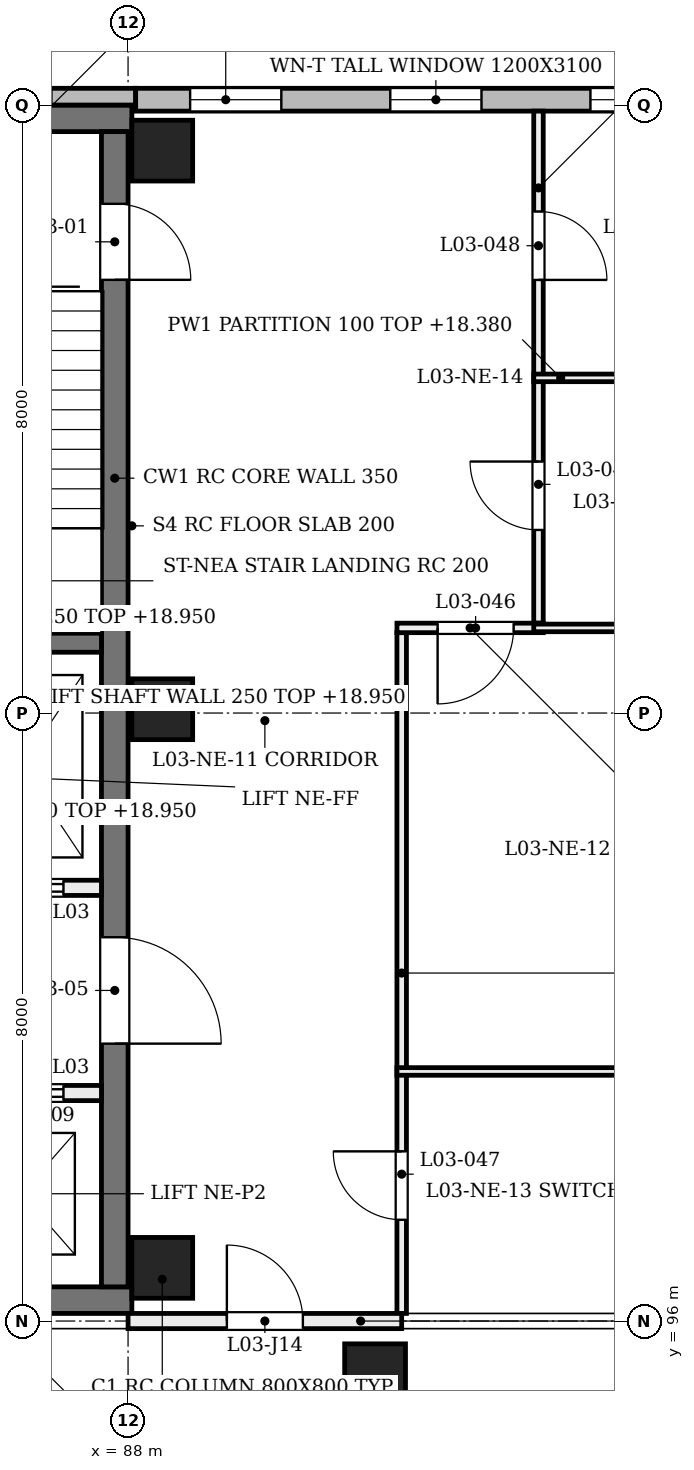
"""IFC4 building model, lengths in metres.
Left out: names, types, materials, properties, quantities, classifications, styles, units other than length and angle.
Written with IfcOpenShell. Run it as: python <this file> out.ifc"""

import sys

from ifc_helpers import new_model, si_unit, direction, frame, frame_2d, origin, origin_2d, place, context, subcontext, project, spatial, rectangle, extrude, element, fill, save


model = new_model("IFC4")
c1 = context("Model", 3, precision=1e-05, world=origin(), true_north=direction((0.0, 1.0)))
c2 = subcontext(c1, "Body", "Model", "MODEL_VIEW")
j1 = project(units=[si_unit("LENGTHUNIT", "METRE"), si_unit("PLANEANGLEUNIT", "RADIAN")], contexts=[c1])
p1 = place(None, origin())
s1 = spatial("IfcSite", under=j1, at=p1, CompositionType="ELEMENT")
p2 = place(p1, origin())
s2 = spatial("IfcBuilding", under=s1, at=p2, CompositionType="ELEMENT")
p3 = place(p2, frame((0.0, 0.0, 14.4)))
s3 = spatial("IfcBuildingStorey", under=s2, at=p3, CompositionType="ELEMENT", Elevation=14.4)
for number, where, z_axis, x_axis in (
    (1, (80.1, 96.275, 0.0), (0.0, 0.0, 1.0), (1.0, 0.0, 0.0)),
    (2, (80.1, 111.825, 0.0), (0.0, 0.0, 1.0), (1.0, 0.0, 0.0)),
):
    element("IfcWall", number, at=place(p3, frame(where, z_axis=z_axis, x_axis=x_axis)), inside=s3, PredefinedType="SHEAR", context=c2, shape_type="SweptSolid", body=[
        extrude(rectangle(XDim=7.95, YDim=0.35, at=frame_2d((3.975, 0.0))), origin(), (0.0, 0.0, 1.0), 4.58),
    ])
p4 = place(p3, frame((87.825, 96.45, 0.0), z_axis=(0.0, 0.0, 1.0), x_axis=(0.0, 1.0, 0.0)))
e3 = element("IfcWall", 3, at=p4, inside=s3, PredefinedType="SHEAR", context=c2, shape_type="SweptSolid", body=[
    extrude(rectangle(XDim=15.2, YDim=0.35, at=frame_2d((7.6, 0.0))), origin(), (0.0, 0.0, 1.0), 4.58),
])
p5 = place(p4, frame((13.25, 0.0, 0.0)))
e4 = element("IfcOpeningElement", 4, at=p5, cuts=e3, PredefinedType="OPENING", context=c2, shape_type="SweptSolid", body=[
    extrude(rectangle(XDim=1.0, YDim=2.1, at=frame_2d((0.5, 1.05))), frame((0.0, 0.185, 0.0), z_axis=(0.0, -1.0, 0.0), x_axis=(1.0, 0.0, 0.0)), (0.0, 0.0, 1.0), 0.37),
])
p6 = place(p4, frame((3.2, 0.0, 0.0)))
e5 = element("IfcOpeningElement", 5, at=p6, cuts=e3, PredefinedType="OPENING", context=c2, shape_type="SweptSolid", body=[
    extrude(rectangle(XDim=1.4, YDim=2.1, at=frame_2d((0.7, 1.05))), frame((0.0, 0.185, 0.0), z_axis=(0.0, -1.0, 0.0), x_axis=(1.0, 0.0, 0.0)), (0.0, 0.0, 1.0), 0.37),
])
for number, where, z_axis, x_axis in (
    (6, (88.45, 96.7, 0.0), (0.0, 0.0, 1.0), (1.0, 0.0, 0.0)),
    (7, (88.45, 104.05, 0.0), (0.0, 0.0, 1.0), (1.0, 0.0, 0.0)),
    (8, (88.45, 111.4, 0.0), (0.0, 0.0, 1.0), (1.0, 0.0, 0.0)),
):
    element("IfcColumn", number, at=place(p3, frame(where, z_axis=z_axis, x_axis=x_axis)), inside=s3, PredefinedType="COLUMN", context=c2, shape_type="SweptSolid", body=[
        extrude(rectangle(XDim=0.8, YDim=0.8, at=origin_2d()), origin(), (0.0, 0.0, 1.0), 4.8),
    ])
p7 = place(p3, frame((91.0, 95.3, 0.0), z_axis=(0.203952265704, 0.0, 0.978980833987), x_axis=(0.0, 1.0, 0.0)))
e9 = element("IfcColumn", 9, at=p7, inside=s3, PredefinedType="COLUMN", context=c2, shape_type="SweptSolid", body=[
    extrude(rectangle(XDim=0.8, YDim=0.8, at=origin_2d()), origin(), (0.0, 0.0, 1.0), 4.903),
])
p8 = place(p3, frame((79.9, 112.11, 0.0), z_axis=(0.0, 0.0, 1.0), x_axis=(1.0, 0.0, 0.0)))
e10 = element("IfcWall", 10, at=p8, inside=s3, PredefinedType="SOLIDWALL", context=c2, shape_type="SweptSolid", body=[
    extrude(rectangle(XDim=8.2, YDim=0.22, at=frame_2d((4.1, 0.0))), origin(), (0.0, 0.0, 1.0), 3.9),
])
p9 = place(p8, frame((1.308, 0.0, 0.9)))
e11 = element("IfcOpeningElement", 11, at=p9, cuts=e10, PredefinedType="OPENING", context=c2, shape_type="SweptSolid", body=[
    extrude(rectangle(XDim=0.45, YDim=2.6, at=frame_2d((0.225, 1.3))), frame((0.0, 0.12, 0.0), z_axis=(0.0, -1.0, 0.0), x_axis=(1.0, 0.0, 0.0)), (0.0, 0.0, 1.0), 0.24),
])
p10 = place(p8, frame((3.975, 0.0, 0.9)))
e12 = element("IfcOpeningElement", 12, at=p10, cuts=e10, PredefinedType="OPENING", context=c2, shape_type="SweptSolid", body=[
    extrude(rectangle(XDim=0.45, YDim=2.6, at=frame_2d((0.225, 1.3))), frame((0.0, 0.12, 0.0), z_axis=(0.0, -1.0, 0.0), x_axis=(1.0, 0.0, 0.0)), (0.0, 0.0, 1.0), 0.24),
])
p11 = place(p8, frame((6.642, 0.0, 0.9)))
e13 = element("IfcOpeningElement", 13, at=p11, cuts=e10, PredefinedType="OPENING", context=c2, shape_type="SweptSolid", body=[
    extrude(rectangle(XDim=0.45, YDim=2.6, at=frame_2d((0.225, 1.3))), frame((0.0, 0.12, 0.0), z_axis=(0.0, -1.0, 0.0), x_axis=(1.0, 0.0, 0.0)), (0.0, 0.0, 1.0), 0.24),
])
p12 = place(p3, frame((88.1, 112.07, 0.0), z_axis=(0.0, 0.0, 1.0), x_axis=(1.0, 0.0, 0.0)))
e14 = element("IfcWall", 14, at=p12, inside=s3, PredefinedType="SOLIDWALL", context=c2, shape_type="SweptSolid", body=[
    extrude(rectangle(XDim=7.9, YDim=0.3, at=frame_2d((3.95, 0.0))), origin(), (0.0, 0.0, 1.0), 3.9),
])
p13 = place(p12, frame((0.717, 0.0, 0.75)))
e15 = element("IfcOpeningElement", 15, at=p13, cuts=e14, PredefinedType="OPENING", context=c2, shape_type="SweptSolid", body=[
    extrude(rectangle(XDim=1.2, YDim=3.1, at=frame_2d((0.6, 1.55))), frame((0.0, 0.16, 0.0), z_axis=(0.0, -1.0, 0.0), x_axis=(1.0, 0.0, 0.0)), (0.0, 0.0, 1.0), 0.32),
])
p14 = place(p12, frame((3.35, 0.0, 0.75)))
e16 = element("IfcOpeningElement", 16, at=p14, cuts=e14, PredefinedType="OPENING", context=c2, shape_type="SweptSolid", body=[
    extrude(rectangle(XDim=1.2, YDim=3.1, at=frame_2d((0.6, 1.55))), frame((0.0, 0.16, 0.0), z_axis=(0.0, -1.0, 0.0), x_axis=(1.0, 0.0, 0.0)), (0.0, 0.0, 1.0), 0.32),
])
p15 = place(p12, frame((5.983, 0.0, 0.75)))
e17 = element("IfcOpeningElement", 17, at=p15, cuts=e14, PredefinedType="OPENING", context=c2, shape_type="SweptSolid", body=[
    extrude(rectangle(XDim=1.2, YDim=3.1, at=frame_2d((0.6, 1.55))), frame((0.0, 0.16, 0.0), z_axis=(0.0, -1.0, 0.0), x_axis=(1.0, 0.0, 0.0)), (0.0, 0.0, 1.0), 0.32),
])
p16 = place(p3, frame((87.65, 104.925, 0.0), z_axis=(0.0, 0.0, 1.0), x_axis=(-1.0, 0.0, 0.0)))
e18 = element("IfcWall", 18, at=p16, inside=s3, PredefinedType="SOLIDWALL", context=c2, shape_type="SweptSolid", body=[
    extrude(rectangle(XDim=3.1, YDim=0.25, at=frame_2d((1.55, 0.0))), origin(), (0.0, 0.0, 1.0), 4.55),
])
p17 = place(p3, frame((87.65, 101.7, 0.0), z_axis=(0.0, 0.0, 1.0), x_axis=(-1.0, 0.0, 0.0)))
e19 = element("IfcWall", 19, at=p17, inside=s3, PredefinedType="SOLIDWALL", context=c2, shape_type="SweptSolid", body=[
    extrude(rectangle(XDim=7.2, YDim=0.2, at=frame_2d((3.6, 0.0))), origin(), (0.0, 0.0, 1.0), 4.55),
])
p18 = place(p17, frame((0.5, 0.0, 0.0)))
e20 = element("IfcOpeningElement", 20, at=p18, cuts=e19, PredefinedType="OPENING", context=c2, shape_type="SweptSolid", body=[
    extrude(rectangle(XDim=1.1, YDim=2.1, at=frame_2d((0.55, 1.05))), frame((0.0, 0.11, 0.0), z_axis=(0.0, -1.0, 0.0), x_axis=(1.0, 0.0, 0.0)), (0.0, 0.0, 1.0), 0.22),
])
p19 = place(p17, frame((5.6, 0.0, 0.0)))
e21 = element("IfcOpeningElement", 21, at=p19, cuts=e19, PredefinedType="OPENING", context=c2, shape_type="SweptSolid", body=[
    extrude(rectangle(XDim=1.1, YDim=2.1, at=frame_2d((0.55, 1.05))), frame((0.0, 0.11, 0.0), z_axis=(0.0, -1.0, 0.0), x_axis=(1.0, 0.0, 0.0)), (0.0, 0.0, 1.0), 0.22),
])
p20 = place(p17, frame((3.1, 0.0, 0.0)))
e22 = element("IfcOpeningElement", 22, at=p20, cuts=e19, PredefinedType="OPENING", context=c2, shape_type="SweptSolid", body=[
    extrude(rectangle(XDim=1.0, YDim=2.1, at=frame_2d((0.5, 1.05))), frame((0.0, 0.11, 0.0), z_axis=(0.0, -1.0, 0.0), x_axis=(1.0, 0.0, 0.0)), (0.0, 0.0, 1.0), 0.22),
])
p21 = place(p3, frame((87.65, 99.0, 0.0), z_axis=(0.0, 0.0, 1.0), x_axis=(-1.0, 0.0, 0.0)))
e23 = element("IfcWall", 23, at=p21, inside=s3, PredefinedType="SOLIDWALL", context=c2, shape_type="SweptSolid", body=[
    extrude(rectangle(XDim=7.2, YDim=0.2, at=frame_2d((3.6, 0.0))), origin(), (0.0, 0.0, 1.0), 4.55),
])
p22 = place(p21, frame((0.5, 0.0, 0.0)))
e24 = element("IfcOpeningElement", 24, at=p22, cuts=e23, PredefinedType="OPENING", context=c2, shape_type="SweptSolid", body=[
    extrude(rectangle(XDim=1.1, YDim=2.1, at=frame_2d((0.55, 1.05))), frame((0.0, 0.11, 0.0), z_axis=(0.0, -1.0, 0.0), x_axis=(1.0, 0.0, 0.0)), (0.0, 0.0, 1.0), 0.22),
])
p23 = place(p21, frame((5.6, 0.0, 0.0)))
e25 = element("IfcOpeningElement", 25, at=p23, cuts=e23, PredefinedType="OPENING", context=c2, shape_type="SweptSolid", body=[
    extrude(rectangle(XDim=1.1, YDim=2.1, at=frame_2d((0.55, 1.05))), frame((0.0, 0.11, 0.0), z_axis=(0.0, -1.0, 0.0), x_axis=(1.0, 0.0, 0.0)), (0.0, 0.0, 1.0), 0.22),
])
p24 = place(p21, frame((3.1, 0.0, 0.0)))
e26 = element("IfcOpeningElement", 26, at=p24, cuts=e23, PredefinedType="OPENING", context=c2, shape_type="SweptSolid", body=[
    extrude(rectangle(XDim=1.0, YDim=2.1, at=frame_2d((0.5, 1.05))), frame((0.0, 0.11, 0.0), z_axis=(0.0, -1.0, 0.0), x_axis=(1.0, 0.0, 0.0)), (0.0, 0.0, 1.0), 0.22),
])
p25 = place(p3, frame((91.6, 96.1, 0.0), z_axis=(0.0, 0.0, 1.0), x_axis=(0.0, 1.0, 0.0)))
e27 = element("IfcWall", 27, at=p25, inside=s3, PredefinedType="PARTITIONING", context=c2, shape_type="SweptSolid", body=[
    extrude(rectangle(XDim=8.958, YDim=0.125, at=frame_2d((4.479, 0.0))), origin(), (0.0, 0.0, 1.0), 3.88),
])
p26 = place(p25, frame((1.233, 0.0, 0.0)))
e28 = element("IfcOpeningElement", 28, at=p26, cuts=e27, PredefinedType="OPENING", context=c2, shape_type="SweptSolid", body=[
    extrude(rectangle(XDim=0.9, YDim=2.1, at=frame_2d((0.45, 1.05))), frame((0.0, 0.073, 0.0), z_axis=(0.0, -1.0, 0.0), x_axis=(1.0, 0.0, 0.0)), (0.0, 0.0, 1.0), 0.145),
])
p27 = place(p3, frame((93.4, 105.183, 0.0), z_axis=(0.0, 0.0, 1.0), x_axis=(0.0, 1.0, 0.0)))
e29 = element("IfcWall", 29, at=p27, inside=s3, PredefinedType="PARTITIONING", context=c2, shape_type="SweptSolid", body=[
    extrude(rectangle(XDim=6.737, YDim=0.125, at=frame_2d((3.369, 0.0))), origin(), (0.0, 0.0, 1.0), 3.88),
])
p28 = place(p27, frame((4.516, 0.0, 0.0)))
e30 = element("IfcOpeningElement", 30, at=p28, cuts=e29, PredefinedType="OPENING", context=c2, shape_type="SweptSolid", body=[
    extrude(rectangle(XDim=0.9, YDim=2.1, at=frame_2d((0.45, 1.05))), frame((0.0, 0.073, 0.0), z_axis=(0.0, -1.0, 0.0), x_axis=(1.0, 0.0, 0.0)), (0.0, 0.0, 1.0), 0.145),
])
p29 = place(p27, frame((1.226, 0.0, 0.0)))
e31 = element("IfcOpeningElement", 31, at=p29, cuts=e29, PredefinedType="OPENING", context=c2, shape_type="SweptSolid", body=[
    extrude(rectangle(XDim=0.9, YDim=2.1, at=frame_2d((0.45, 1.05))), frame((0.0, 0.073, 0.0), z_axis=(0.0, -1.0, 0.0), x_axis=(1.0, 0.0, 0.0)), (0.0, 0.0, 1.0), 0.145),
])
p30 = place(p3, frame((91.538, 99.284, 0.0), z_axis=(0.0, 0.0, 1.0), x_axis=(1.0, 0.0, 0.0)))
e32 = element("IfcWall", 32, at=p30, inside=s3, PredefinedType="PARTITIONING", context=c2, shape_type="SweptSolid", body=[
    extrude(rectangle(XDim=4.382, YDim=0.1, at=frame_2d((2.191, 0.0))), origin(), (0.0, 0.0, 1.0), 3.88),
])
p31 = place(p3, frame((91.538, 105.12, 0.0), z_axis=(0.0, 0.0, 1.0), x_axis=(1.0, 0.0, 0.0)))
e33 = element("IfcWall", 33, at=p31, inside=s3, PredefinedType="PARTITIONING", context=c2, shape_type="SweptSolid", body=[
    extrude(rectangle(XDim=1.925, YDim=0.125, at=frame_2d((0.962, 0.0))), origin(), (0.0, 0.0, 1.0), 4.56),
])
p32 = place(p31, frame((0.535, 0.0, 0.0)))
e34 = element("IfcOpeningElement", 34, at=p32, cuts=e33, PredefinedType="OPENING", context=c2, shape_type="SweptSolid", body=[
    extrude(rectangle(XDim=1.0, YDim=2.1, at=frame_2d((0.5, 1.05))), frame((0.0, 0.073, 0.0), z_axis=(0.0, -1.0, 0.0), x_axis=(1.0, 0.0, 0.0)), (0.0, 0.0, 1.0), 0.145),
])
for number, where, z_axis, x_axis in (
    (35, (93.337, 105.12, 0.0), (0.0, 0.0, 1.0), (1.0, 0.0, 0.0)),
    (36, (93.337, 108.41, 0.0), (0.0, 0.0, 1.0), (1.0, 0.0, 0.0)),
):
    element("IfcWall", number, at=place(p3, frame(where, z_axis=z_axis, x_axis=x_axis)), inside=s3, PredefinedType="PARTITIONING", context=c2, shape_type="SweptSolid", body=[
        extrude(rectangle(XDim=2.363, YDim=0.1, at=frame_2d((1.181, 0.0))), origin(), (0.0, 0.0, 1.0), 3.98),
    ])
p33 = place(p3, frame((88.0, 96.0, 0.0), z_axis=(0.0, 0.0, 1.0), x_axis=(1.0, 0.0, 0.0)))
e37 = element("IfcWall", 37, at=p33, inside=s3, PredefinedType="PARTITIONING", context=c2, shape_type="SweptSolid", body=[
    extrude(rectangle(XDim=3.6, YDim=0.2, at=frame_2d((1.8, 0.0))), origin(), (0.0, 0.0, 1.0), 3.88),
])
p34 = place(p33, frame((1.3, 0.0, 0.0)))
e38 = element("IfcOpeningElement", 38, at=p34, cuts=e37, PredefinedType="OPENING", context=c2, shape_type="SweptSolid", body=[
    extrude(rectangle(XDim=1.0, YDim=2.1, at=frame_2d((0.5, 1.05))), frame((0.0, 0.11, 0.0), z_axis=(0.0, -1.0, 0.0), x_axis=(1.0, 0.0, 0.0)), (0.0, 0.0, 1.0), 0.22),
])
p35 = place(p13, origin())
e39 = element("IfcWindow", 39, at=p35, inside=s3, PartitioningType="SINGLE_PANEL", PredefinedType="WINDOW", context=c2, shape_type="SweptSolid", body=[
    extrude(rectangle(XDim=1.2, YDim=3.1, at=frame_2d((0.6, 1.55))), frame((0.0, 0.03, 0.0), z_axis=(0.0, -1.0, 0.0), x_axis=(1.0, 0.0, 0.0)), (0.0, 0.0, 1.0), 0.06),
])
fill(e15, e39)
p36 = place(p14, origin())
e40 = element("IfcWindow", 40, at=p36, inside=s3, PartitioningType="SINGLE_PANEL", PredefinedType="WINDOW", context=c2, shape_type="SweptSolid", body=[
    extrude(rectangle(XDim=1.2, YDim=3.1, at=frame_2d((0.6, 1.55))), frame((0.0, 0.03, 0.0), z_axis=(0.0, -1.0, 0.0), x_axis=(1.0, 0.0, 0.0)), (0.0, 0.0, 1.0), 0.06),
])
fill(e16, e40)
p37 = place(p15, origin())
e41 = element("IfcWindow", 41, at=p37, inside=s3, PartitioningType="SINGLE_PANEL", PredefinedType="WINDOW", context=c2, shape_type="SweptSolid", body=[
    extrude(rectangle(XDim=1.2, YDim=3.1, at=frame_2d((0.6, 1.55))), frame((0.0, 0.03, 0.0), z_axis=(0.0, -1.0, 0.0), x_axis=(1.0, 0.0, 0.0)), (0.0, 0.0, 1.0), 0.06),
])
fill(e17, e41)
p38 = place(p5, frame((1.0, 0.0, 0.0), z_axis=(0.0, 0.0, 1.0), x_axis=(-1.0, 0.0, 0.0)))
e42 = element("IfcDoor", 42, at=p38, inside=s3, OperationType="SINGLE_SWING_LEFT", PredefinedType="DOOR", context=c2, shape_type="SweptSolid", body=[
    extrude(rectangle(XDim=1.0, YDim=2.1, at=frame_2d((0.5, 1.05))), frame((0.0, 0.025, 0.0), z_axis=(0.0, -1.0, 0.0), x_axis=(1.0, 0.0, 0.0)), (0.0, 0.0, 1.0), 0.05),
])
fill(e4, e42)
p39 = place(p18, origin())
e43 = element("IfcDoor", 43, at=p39, inside=s3, OperationType="DOUBLE_DOOR_SLIDING", PredefinedType="DOOR", context=c2, shape_type="SweptSolid", body=[
    extrude(rectangle(XDim=1.1, YDim=2.1, at=frame_2d((0.55, 1.05))), frame((0.0, 0.025, 0.0), z_axis=(0.0, -1.0, 0.0), x_axis=(1.0, 0.0, 0.0)), (0.0, 0.0, 1.0), 0.05),
])
fill(e20, e43)
p40 = place(p22, frame((1.1, 0.0, 0.0), z_axis=(0.0, 0.0, 1.0), x_axis=(-1.0, 0.0, 0.0)))
e44 = element("IfcDoor", 44, at=p40, inside=s3, OperationType="DOUBLE_DOOR_SLIDING", PredefinedType="DOOR", context=c2, shape_type="SweptSolid", body=[
    extrude(rectangle(XDim=1.1, YDim=2.1, at=frame_2d((0.55, 1.05))), frame((0.0, 0.025, 0.0), z_axis=(0.0, -1.0, 0.0), x_axis=(1.0, 0.0, 0.0)), (0.0, 0.0, 1.0), 0.05),
])
fill(e24, e44)
p41 = place(p6, frame((1.4, 0.0, 0.0), z_axis=(0.0, 0.0, 1.0), x_axis=(-1.0, 0.0, 0.0)))
e45 = element("IfcDoor", 45, at=p41, inside=s3, OperationType="SINGLE_SWING_LEFT", PredefinedType="DOOR", context=c2, shape_type="SweptSolid", body=[
    extrude(rectangle(XDim=1.4, YDim=2.1, at=frame_2d((0.7, 1.05))), frame((0.0, 0.025, 0.0), z_axis=(0.0, -1.0, 0.0), x_axis=(1.0, 0.0, 0.0)), (0.0, 0.0, 1.0), 0.05),
])
fill(e5, e45)
p42 = place(p32, frame((1.0, 0.0, 0.0), z_axis=(0.0, 0.0, 1.0), x_axis=(-1.0, 0.0, 0.0)))
e46 = element("IfcDoor", 46, at=p42, inside=s3, OperationType="SINGLE_SWING_LEFT", PredefinedType="DOOR", context=c2, shape_type="SweptSolid", body=[
    extrude(rectangle(XDim=1.0, YDim=2.1, at=frame_2d((0.5, 1.05))), frame((0.0, 0.025, 0.0), z_axis=(0.0, -1.0, 0.0), x_axis=(1.0, 0.0, 0.0)), (0.0, 0.0, 1.0), 0.05),
])
fill(e34, e46)
p43 = place(p26, frame((0.9, 0.0, 0.0), z_axis=(0.0, 0.0, 1.0), x_axis=(-1.0, 0.0, 0.0)))
e47 = element("IfcDoor", 47, at=p43, inside=s3, OperationType="SINGLE_SWING_RIGHT", PredefinedType="DOOR", context=c2, shape_type="SweptSolid", body=[
    extrude(rectangle(XDim=0.9, YDim=2.1, at=frame_2d((0.45, 1.05))), frame((0.0, 0.025, 0.0), z_axis=(0.0, -1.0, 0.0), x_axis=(1.0, 0.0, 0.0)), (0.0, 0.0, 1.0), 0.05),
])
fill(e28, e47)
p44 = place(p28, frame((0.9, 0.0, 0.0), z_axis=(0.0, 0.0, 1.0), x_axis=(-1.0, 0.0, 0.0)))
e48 = element("IfcDoor", 48, at=p44, inside=s3, OperationType="SINGLE_SWING_LEFT", PredefinedType="DOOR", context=c2, shape_type="SweptSolid", body=[
    extrude(rectangle(XDim=0.9, YDim=2.1, at=frame_2d((0.45, 1.05))), frame((0.0, 0.025, 0.0), z_axis=(0.0, -1.0, 0.0), x_axis=(1.0, 0.0, 0.0)), (0.0, 0.0, 1.0), 0.05),
])
fill(e30, e48)
p45 = place(p29, frame((0.9, 0.0, 0.0), z_axis=(0.0, 0.0, 1.0), x_axis=(-1.0, 0.0, 0.0)))
e49 = element("IfcDoor", 49, at=p45, inside=s3, OperationType="SINGLE_SWING_RIGHT", PredefinedType="DOOR", context=c2, shape_type="SweptSolid", body=[
    extrude(rectangle(XDim=0.9, YDim=2.1, at=frame_2d((0.45, 1.05))), frame((0.0, 0.025, 0.0), z_axis=(0.0, -1.0, 0.0), x_axis=(1.0, 0.0, 0.0)), (0.0, 0.0, 1.0), 0.05),
])
fill(e31, e49)
p46 = place(p34, origin())
e50 = element("IfcDoor", 50, at=p46, inside=s3, OperationType="SINGLE_SWING_LEFT", PredefinedType="DOOR", context=c2, shape_type="SweptSolid", body=[
    extrude(rectangle(XDim=1.0, YDim=2.1, at=frame_2d((0.5, 1.05))), frame((0.0, 0.025, 0.0), z_axis=(0.0, -1.0, 0.0), x_axis=(1.0, 0.0, 0.0)), (0.0, 0.0, 1.0), 0.05),
])
fill(e38, e50)
save(model, sys.argv[1])
